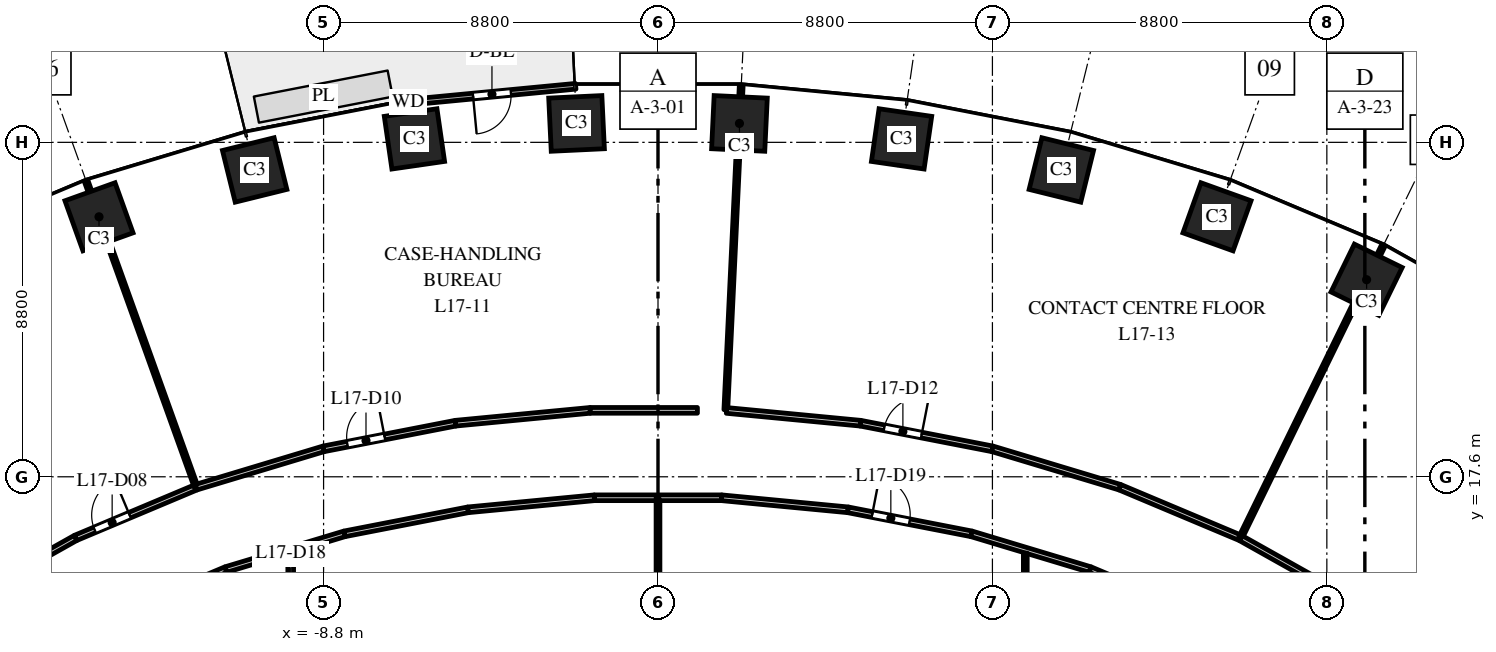
"""IFC4 building model, lengths in metres.
Left out: names, types, materials, properties, quantities, classifications, styles, units other than length and angle.
Written with IfcOpenShell. Run it as: python <this file> out.ifc"""

import sys

from ifc_helpers import new_model, si_unit, direction, frame, frame_2d, origin, origin_2d, place, context, subcontext, project, spatial, rectangle, extrude, element, fill, save


model = new_model("IFC4")
c1 = context("Model", 3, precision=1e-05, world=origin(), true_north=direction((0.0, 1.0)))
c2 = subcontext(c1, "Body", "Model", "MODEL_VIEW")
j1 = project(units=[si_unit("LENGTHUNIT", "METRE"), si_unit("PLANEANGLEUNIT", "RADIAN")], contexts=[c1])
p1 = place(None, origin())
s1 = spatial("IfcSite", under=j1, at=p1, CompositionType="ELEMENT")
p2 = place(p1, origin())
s2 = spatial("IfcBuilding", under=s1, at=p2, CompositionType="ELEMENT")
p3 = place(p2, frame((0.0, 0.0, 78.5)))
s3 = spatial("IfcBuildingStorey", under=s2, at=p3, CompositionType="ELEMENT", Elevation=78.5)
for number, where, z_axis, x_axis in (
    (1, (18.646, 22.785, 0.0), (0.0, 0.0, 1.0), (-0.898, 0.439, 0.0)),
    (2, (14.709, 24.441, 0.0), (0.0, 0.0, 1.0), (-0.941, 0.338, 0.0)),
    (3, (10.613, 25.674, 0.0), (0.0, 0.0, 1.0), (-0.971, 0.24, 0.0)),
    (4, (6.409, 26.491, 0.0), (0.0, 0.0, 1.0), (-0.99, 0.143, 0.0)),
    (5, (2.143, 26.898, 0.0), (0.0, 0.0, 1.0), (-0.999, 0.048, 0.0)),
    (6, (-2.143, 26.898, 0.0), (0.0, 0.0, 1.0), (-0.999, -0.048, 0.0)),
    (7, (-6.409, 26.491, 0.0), (0.0, 0.0, 1.0), (-0.99, -0.143, 0.0)),
    (8, (-10.613, 25.674, 0.0), (0.0, 0.0, 1.0), (-0.971, -0.24, 0.0)),
    (9, (-14.709, 24.441, 0.0), (0.0, 0.0, 1.0), (-0.941, -0.338, 0.0)),
):
    element("IfcColumn", number, at=place(p3, frame(where, z_axis=z_axis, x_axis=x_axis)), inside=s3, PredefinedType="COLUMN", context=c2, shape_type="SweptSolid", body=[
        extrude(rectangle(XDim=1.4, YDim=1.4, at=origin_2d()), origin(), (0.0, 0.0, 1.0), 4.0),
    ])
p4 = place(p3, frame((-2.166, 27.875, 0.0), z_axis=(0.0, 0.0, 1.0), x_axis=(-0.995473879823, -0.095035543824, 0.0)))
e10 = element("IfcWall", 10, at=p4, inside=s3, PredefinedType="STANDARD", context=c2, shape_type="SweptSolid", body=[
    extrude(rectangle(XDim=4.426, YDim=0.15, at=frame_2d((2.213, 0.0))), origin(), (0.0, 0.0, 1.0), 3.7),
])
p5 = place(p4, frame((1.713, 0.0, 0.0)))
e11 = element("IfcOpeningElement", 11, at=p5, cuts=e10, PredefinedType="OPENING", context=c2, shape_type="SweptSolid", body=[
    extrude(rectangle(XDim=1.0, YDim=2.4, at=frame_2d((0.5, 1.2))), frame((0.0, 0.085, 0.0), z_axis=(0.0, -1.0, 0.0), x_axis=(1.0, 0.0, 0.0)), (0.0, 0.0, 1.0), 0.17),
])
p6 = place(p3, frame((-18.26, 14.344, 0.0), z_axis=(0.0, 0.0, 1.0), x_axis=(0.871958798398, 0.489579262118, 0.0)))
e12 = element("IfcWall", 12, at=p6, inside=s3, PredefinedType="PARTITIONING", context=c2, shape_type="SweptSolid", body=[
    extrude(rectangle(XDim=3.366, YDim=0.15, at=frame_2d((1.683, 0.0))), origin(), (0.0, 0.0, 1.0), 3.7),
])
p7 = place(p3, frame((-15.325, 15.992, 0.0), z_axis=(0.0, 0.0, 1.0), x_axis=(0.921891448612, 0.387448263612, 0.0)))
e13 = element("IfcWall", 13, at=p7, inside=s3, PredefinedType="PARTITIONING", context=c2, shape_type="SweptSolid", body=[
    extrude(rectangle(XDim=3.443, YDim=0.15, at=frame_2d((1.722, 0.0))), origin(), (0.0, 0.0, 1.0), 2.85),
])
p8 = place(p7, frame((0.543, 0.0, 0.0)))
e14 = element("IfcOpeningElement", 14, at=p8, cuts=e13, PredefinedType="OPENING", context=c2, shape_type="SweptSolid", body=[
    extrude(rectangle(XDim=1.0, YDim=2.1, at=frame_2d((0.5, 1.05))), frame((0.0, 0.085, 0.0), z_axis=(0.0, -1.0, 0.0), x_axis=(1.0, 0.0, 0.0)), (0.0, 0.0, 1.0), 0.17),
])
p9 = place(p3, frame((-15.048, 25.383, 0.0), z_axis=(0.0, 0.0, 1.0), x_axis=(0.338300183564, -0.941038248851, 0.0)))
e15 = element("IfcWall", 15, at=p9, inside=s3, PredefinedType="PARTITIONING", context=c2, shape_type="SweptSolid", body=[
    extrude(rectangle(XDim=8.558, YDim=0.1, at=frame_2d((4.279, 0.0))), origin(), (0.0, 0.0, 1.0), 2.85),
])
p10 = place(p3, frame((-14.313, 13.922, 0.0), z_axis=(0.0, 0.0, 1.0), x_axis=(0.921799502591, 0.387666966638, 0.0)))
e16 = element("IfcWall", 16, at=p10, inside=s3, PredefinedType="PARTITIONING", context=c2, shape_type="SweptSolid", body=[
    extrude(rectangle(XDim=3.19, YDim=0.15, at=frame_2d((1.595, 0.0))), origin(), (0.0, 0.0, 1.0), 2.85),
])
p11 = place(p3, frame((-12.151, 17.326, 0.0), z_axis=(0.0, 0.0, 1.0), x_axis=(0.957528149021, 0.288339806186, 0.0)))
e17 = element("IfcWall", 17, at=p11, inside=s3, PredefinedType="PARTITIONING", context=c2, shape_type="SweptSolid", body=[
    extrude(rectangle(XDim=3.5, YDim=0.15, at=frame_2d((1.75, 0.0))), origin(), (0.0, 0.0, 1.0), 3.7),
])
p12 = place(p3, frame((-11.372, 15.159, 0.0), z_axis=(0.0, 0.0, 1.0), x_axis=(0.95757464185, 0.28818536619, 0.0)))
e18 = element("IfcWall", 18, at=p12, inside=s3, PredefinedType="PARTITIONING", context=c2, shape_type="SweptSolid", body=[
    extrude(rectangle(XDim=3.262, YDim=0.15, at=frame_2d((1.631, 0.0))), origin(), (0.0, 0.0, 1.0), 3.7),
])
p13 = place(p3, frame((-9.665, -15.591, 0.0), z_axis=(0.0, 0.0, 1.0), x_axis=(0.0, 1.0, 0.0)))
e19 = element("IfcWall", 19, at=p13, inside=s3, PredefinedType="PARTITIONING", context=c2, shape_type="SweptSolid", body=[
    extrude(rectangle(XDim=31.182, YDim=0.15, at=frame_2d((15.591, 0.0))), origin(), (0.0, 0.0, 1.0), 2.75),
])
p14 = place(p13, frame((29.572, 0.0, 0.0)))
e20 = element("IfcOpeningElement", 20, at=p14, cuts=e19, PredefinedType="OPENING", context=c2, shape_type="SweptSolid", body=[
    extrude(rectangle(XDim=1.0, YDim=2.1, at=frame_2d((0.5, 1.05))), frame((0.0, 0.085, 0.0), z_axis=(0.0, -1.0, 0.0), x_axis=(1.0, 0.0, 0.0)), (0.0, 0.0, 1.0), 0.17),
])
p15 = place(p3, frame((-8.8, 18.335, 0.0), z_axis=(0.0, 0.0, 1.0), x_axis=(0.981620418387, 0.190843795306, 0.0)))
e21 = element("IfcWall", 21, at=p15, inside=s3, PredefinedType="PARTITIONING", context=c2, shape_type="SweptSolid", body=[
    extrude(rectangle(XDim=3.537, YDim=0.15, at=frame_2d((1.769, 0.0))), origin(), (0.0, 0.0, 1.0), 2.85),
])
p16 = place(p15, frame((0.637, 0.0, 0.0)))
e22 = element("IfcOpeningElement", 22, at=p16, cuts=e21, PredefinedType="OPENING", context=c2, shape_type="SweptSolid", body=[
    extrude(rectangle(XDim=1.0, YDim=2.1, at=frame_2d((0.5, 1.05))), frame((0.0, 0.085, 0.0), z_axis=(0.0, -1.0, 0.0), x_axis=(1.0, 0.0, 0.0)), (0.0, 0.0, 1.0), 0.17),
])
p17 = place(p3, frame((-8.248, 16.099, 0.0), z_axis=(0.0, 0.0, 1.0), x_axis=(0.981621529558, 0.190838079815, 0.0)))
e23 = element("IfcWall", 23, at=p17, inside=s3, PredefinedType="PARTITIONING", context=c2, shape_type="SweptSolid", body=[
    extrude(rectangle(XDim=3.311, YDim=0.15, at=frame_2d((1.655, 0.0))), origin(), (0.0, 0.0, 1.0), 2.85),
])
p18 = place(p3, frame((-5.328, 19.01, 0.0), z_axis=(0.0, 0.0, 1.0), x_axis=(0.995485604231, 0.094912653366, 0.0)))
e24 = element("IfcWall", 24, at=p18, inside=s3, PredefinedType="PARTITIONING", context=c2, shape_type="SweptSolid", body=[
    extrude(rectangle(XDim=3.56, YDim=0.15, at=frame_2d((1.78, 0.0))), origin(), (0.0, 0.0, 1.0), 3.7),
])
p19 = place(p3, frame((-4.998, 16.731, 0.0), z_axis=(0.0, 0.0, 1.0), x_axis=(0.995479356205, 0.094978162593, 0.0)))
e25 = element("IfcWall", 25, at=p19, inside=s3, PredefinedType="PARTITIONING", context=c2, shape_type="SweptSolid", body=[
    extrude(rectangle(XDim=3.339, YDim=0.15, at=frame_2d((1.669, 0.0))), origin(), (0.0, 0.0, 1.0), 3.7),
])
p20 = place(p3, frame((-1.784, 19.348, 0.0), z_axis=(0.0, 0.0, 1.0), x_axis=(1.0, 0.0, 0.0)))
e26 = element("IfcWall", 26, at=p20, inside=s3, PredefinedType="PARTITIONING", context=c2, shape_type="SweptSolid", body=[
    extrude(rectangle(XDim=2.821, YDim=0.15, at=frame_2d((1.411, 0.0))), origin(), (0.0, 0.0, 1.0), 2.85),
])
p21 = place(p3, frame((-1.674, 17.048, 0.0), z_axis=(0.0, 0.0, 1.0), x_axis=(1.0, 0.0, 0.0)))
e27 = element("IfcWall", 27, at=p21, inside=s3, PredefinedType="PARTITIONING", context=c2, shape_type="SweptSolid", body=[
    extrude(rectangle(XDim=1.674, YDim=0.15, at=frame_2d((0.837, 0.0))), origin(), (0.0, 0.0, 1.0), 2.85),
])
p22 = place(p3, frame((0.0, 7.504, 0.0), z_axis=(0.0, 0.0, 1.0), x_axis=(0.0, 1.0, 0.0)))
e28 = element("IfcWall", 28, at=p22, inside=s3, PredefinedType="PARTITIONING", context=c2, shape_type="SweptSolid", body=[
    extrude(rectangle(XDim=9.54, YDim=0.1, at=frame_2d((4.77, 0.0))), origin(), (0.0, 0.0, 1.0), 3.7),
])
p23 = place(p3, frame((0.02, 17.048, 0.0), z_axis=(0.0, 0.0, 1.0), x_axis=(1.0, 0.0, 0.0)))
e29 = element("IfcWall", 29, at=p23, inside=s3, PredefinedType="PARTITIONING", context=c2, shape_type="SweptSolid", body=[
    extrude(rectangle(XDim=1.654, YDim=0.15, at=frame_2d((0.827, 0.0))), origin(), (0.0, 0.0, 1.0), 3.7),
])
p24 = place(p3, frame((1.674, 17.048, 0.0), z_axis=(0.0, 0.0, 1.0), x_axis=(0.995479356205, -0.094978162593, 0.0)))
e30 = element("IfcWall", 30, at=p24, inside=s3, PredefinedType="PARTITIONING", context=c2, shape_type="SweptSolid", body=[
    extrude(rectangle(XDim=3.339, YDim=0.15, at=frame_2d((1.669, 0.0))), origin(), (0.0, 0.0, 1.0), 2.85),
])
p25 = place(p3, frame((1.785, 19.365, 0.0), z_axis=(0.0, 0.0, 1.0), x_axis=(0.04741307074, 0.998875367963, 0.0)))
e31 = element("IfcWall", 31, at=p25, inside=s3, PredefinedType="PARTITIONING", context=c2, shape_type="SweptSolid", body=[
    extrude(rectangle(XDim=8.542, YDim=0.1, at=frame_2d((4.271, 0.0))), origin(), (0.0, 0.0, 1.0), 2.85),
])
p26 = place(p3, frame((1.804, 19.346, 0.0), z_axis=(0.0, 0.0, 1.0), x_axis=(0.99548678928, -0.094900223226, 0.0)))
e32 = element("IfcWall", 32, at=p26, inside=s3, PredefinedType="PARTITIONING", context=c2, shape_type="SweptSolid", body=[
    extrude(rectangle(XDim=3.54, YDim=0.15, at=frame_2d((1.77, 0.0))), origin(), (0.0, 0.0, 1.0), 2.85),
])
p27 = place(p3, frame((4.998, 16.731, 0.0), z_axis=(0.0, 0.0, 1.0), x_axis=(0.981621529558, -0.190838079815, 0.0)))
e33 = element("IfcWall", 33, at=p27, inside=s3, PredefinedType="PARTITIONING", context=c2, shape_type="SweptSolid", body=[
    extrude(rectangle(XDim=3.311, YDim=0.15, at=frame_2d((1.655, 0.0))), origin(), (0.0, 0.0, 1.0), 3.7),
])
p28 = place(p27, frame((0.65, 0.0, 0.0)))
e34 = element("IfcOpeningElement", 34, at=p28, cuts=e33, PredefinedType="OPENING", context=c2, shape_type="SweptSolid", body=[
    extrude(rectangle(XDim=1.0, YDim=2.1, at=frame_2d((0.5, 1.05))), frame((0.0, 0.085, 0.0), z_axis=(0.0, -1.0, 0.0), x_axis=(1.0, 0.0, 0.0)), (0.0, 0.0, 1.0), 0.17),
])
p29 = place(p3, frame((5.328, 19.01, 0.0), z_axis=(0.0, 0.0, 1.0), x_axis=(0.981620418387, -0.190843795306, 0.0)))
e35 = element("IfcWall", 35, at=p29, inside=s3, PredefinedType="PARTITIONING", context=c2, shape_type="SweptSolid", body=[
    extrude(rectangle(XDim=3.537, YDim=0.15, at=frame_2d((1.769, 0.0))), origin(), (0.0, 0.0, 1.0), 3.7),
])
p30 = place(p29, frame((0.637, 0.0, 0.0)))
e36 = element("IfcOpeningElement", 36, at=p30, cuts=e35, PredefinedType="OPENING", context=c2, shape_type="SweptSolid", body=[
    extrude(rectangle(XDim=1.0, YDim=2.1, at=frame_2d((0.5, 1.05))), frame((0.0, 0.085, 0.0), z_axis=(0.0, -1.0, 0.0), x_axis=(1.0, 0.0, 0.0)), (0.0, 0.0, 1.0), 0.17),
])
p31 = place(p3, frame((8.248, 16.099, 0.0), z_axis=(0.0, 0.0, 1.0), x_axis=(0.95757464185, -0.28818536619, 0.0)))
e37 = element("IfcWall", 37, at=p31, inside=s3, PredefinedType="PARTITIONING", context=c2, shape_type="SweptSolid", body=[
    extrude(rectangle(XDim=3.262, YDim=0.15, at=frame_2d((1.631, 0.0))), origin(), (0.0, 0.0, 1.0), 2.85),
])
p32 = place(p3, frame((8.8, 18.335, 0.0), z_axis=(0.0, 0.0, 1.0), x_axis=(0.957528149021, -0.288339806186, 0.0)))
e38 = element("IfcWall", 38, at=p32, inside=s3, PredefinedType="PARTITIONING", context=c2, shape_type="SweptSolid", body=[
    extrude(rectangle(XDim=3.5, YDim=0.15, at=frame_2d((1.75, 0.0))), origin(), (0.0, 0.0, 1.0), 2.85),
])
p33 = place(p3, frame((9.665, -15.591, 0.0), z_axis=(0.0, 0.0, 1.0), x_axis=(0.0, 1.0, 0.0)))
e39 = element("IfcWall", 39, at=p33, inside=s3, PredefinedType="PARTITIONING", context=c2, shape_type="SweptSolid", body=[
    extrude(rectangle(XDim=31.182, YDim=0.1, at=frame_2d((15.591, 0.0))), origin(), (0.0, 0.0, 1.0), 2.75),
])
p34 = place(p3, frame((11.372, 15.159, 0.0), z_axis=(0.0, 0.0, 1.0), x_axis=(0.921799502591, -0.387666966638, 0.0)))
e40 = element("IfcWall", 40, at=p34, inside=s3, PredefinedType="PARTITIONING", context=c2, shape_type="SweptSolid", body=[
    extrude(rectangle(XDim=3.19, YDim=0.15, at=frame_2d((1.595, 0.0))), origin(), (0.0, 0.0, 1.0), 3.7),
])
p35 = place(p3, frame((12.151, 17.326, 0.0), z_axis=(0.0, 0.0, 1.0), x_axis=(0.921891448612, -0.387448263612, 0.0)))
e41 = element("IfcWall", 41, at=p35, inside=s3, PredefinedType="PARTITIONING", context=c2, shape_type="SweptSolid", body=[
    extrude(rectangle(XDim=3.443, YDim=0.15, at=frame_2d((1.722, 0.0))), origin(), (0.0, 0.0, 1.0), 3.7),
])
p36 = place(p3, frame((15.326, 15.995, 0.0), z_axis=(0.0, 0.0, 1.0), x_axis=(0.439255658574, 0.898362102056, 0.0)))
e42 = element("IfcWall", 42, at=p36, inside=s3, PredefinedType="PARTITIONING", context=c2, shape_type="SweptSolid", body=[
    extrude(rectangle(XDim=8.56, YDim=0.1, at=frame_2d((4.28, 0.0))), origin(), (0.0, 0.0, 1.0), 2.85),
])
p37 = place(p3, frame((15.342, 15.982, 0.0), z_axis=(0.0, 0.0, 1.0), x_axis=(0.872011649609, -0.48948512025, 0.0)))
e43 = element("IfcWall", 43, at=p37, inside=s3, PredefinedType="PARTITIONING", context=c2, shape_type="SweptSolid", body=[
    extrude(rectangle(XDim=3.346, YDim=0.15, at=frame_2d((1.673, 0.0))), origin(), (0.0, 0.0, 1.0), 3.7),
])
p38 = place(p5, origin())
e44 = element("IfcDoor", 44, at=p38, inside=s3, OperationType="SINGLE_SWING_RIGHT", PredefinedType="DOOR", context=c2, shape_type="SweptSolid", body=[
    extrude(rectangle(XDim=1.0, YDim=2.4, at=frame_2d((0.5, 1.2))), frame((0.0, 0.025, 0.0), z_axis=(0.0, -1.0, 0.0), x_axis=(1.0, 0.0, 0.0)), (0.0, 0.0, 1.0), 0.05),
])
fill(e11, e44)
p39 = place(p8, origin())
e45 = element("IfcDoor", 45, at=p39, inside=s3, OperationType="SINGLE_SWING_RIGHT", PredefinedType="DOOR", context=c2, shape_type="SweptSolid", body=[
    extrude(rectangle(XDim=1.0, YDim=2.1, at=frame_2d((0.5, 1.05))), frame((0.0, 0.025, 0.0), z_axis=(0.0, -1.0, 0.0), x_axis=(1.0, 0.0, 0.0)), (0.0, 0.0, 1.0), 0.05),
])
fill(e14, e45)
p40 = place(p16, origin())
e46 = element("IfcDoor", 46, at=p40, inside=s3, OperationType="SINGLE_SWING_RIGHT", PredefinedType="DOOR", context=c2, shape_type="SweptSolid", body=[
    extrude(rectangle(XDim=1.0, YDim=2.1, at=frame_2d((0.5, 1.05))), frame((0.0, 0.025, 0.0), z_axis=(0.0, -1.0, 0.0), x_axis=(1.0, 0.0, 0.0)), (0.0, 0.0, 1.0), 0.05),
])
fill(e22, e46)
p41 = place(p30, origin())
e47 = element("IfcDoor", 47, at=p41, inside=s3, OperationType="SINGLE_SWING_RIGHT", PredefinedType="DOOR", context=c2, shape_type="SweptSolid", body=[
    extrude(rectangle(XDim=1.0, YDim=2.1, at=frame_2d((0.5, 1.05))), frame((0.0, 0.025, 0.0), z_axis=(0.0, -1.0, 0.0), x_axis=(1.0, 0.0, 0.0)), (0.0, 0.0, 1.0), 0.05),
])
fill(e36, e47)
p42 = place(p28, origin())
e48 = element("IfcDoor", 48, at=p42, inside=s3, OperationType="SINGLE_SWING_LEFT", PredefinedType="DOOR", context=c2, shape_type="SweptSolid", body=[
    extrude(rectangle(XDim=1.0, YDim=2.1, at=frame_2d((0.5, 1.05))), frame((0.0, 0.025, 0.0), z_axis=(0.0, -1.0, 0.0), x_axis=(1.0, 0.0, 0.0)), (0.0, 0.0, 1.0), 0.05),
])
fill(e34, e48)
save(model, sys.argv[1])
